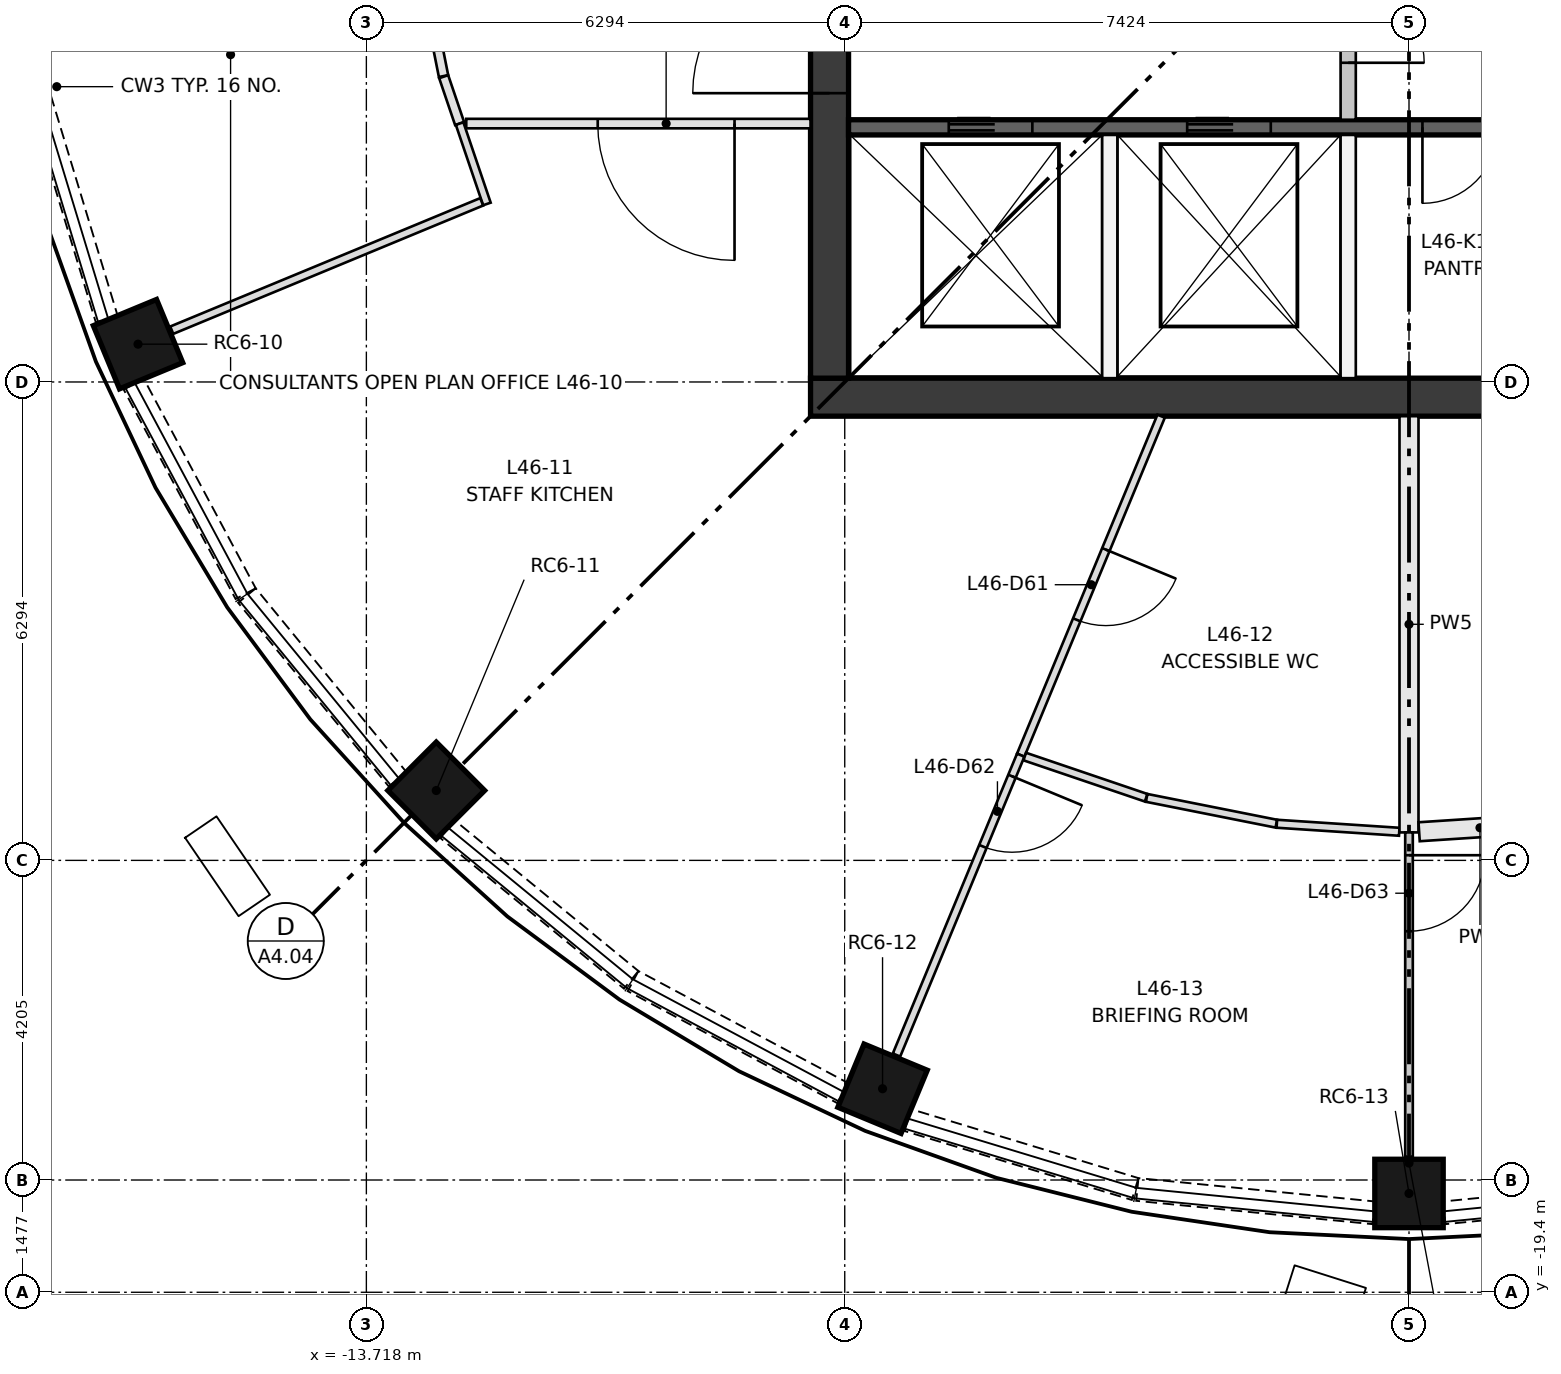
"""IFC4 building model, lengths in metres.
Left out: names, types, materials, properties, quantities, classifications, styles, units other than length and angle.
Written with IfcOpenShell. Run it as: python <this file> out.ifc"""

import sys

from ifc_helpers import new_model, si_unit, direction, frame, frame_2d, origin, origin_2d, place, context, subcontext, project, spatial, rectangle, extrude, element, fill, save


model = new_model("IFC4")
c1 = context("Model", 3, precision=1e-05, world=origin(), true_north=direction((0.0, 1.0)))
c2 = subcontext(c1, "Body", "Model", "MODEL_VIEW")
j1 = project(units=[si_unit("LENGTHUNIT", "METRE"), si_unit("PLANEANGLEUNIT", "RADIAN")], contexts=[c1])
p1 = place(None, origin())
s1 = spatial("IfcSite", under=j1, at=p1, CompositionType="ELEMENT")
p2 = place(p1, origin())
s2 = spatial("IfcBuilding", under=s1, at=p2, CompositionType="ELEMENT")
p3 = place(p2, frame((0.0, 0.0, 174.25)))
s3 = spatial("IfcBuildingStorey", under=s2, at=p3, CompositionType="ELEMENT", Elevation=174.25)
for number, where, z_axis, x_axis in (
    (1, (-16.722, -6.927, 0.0), (0.0, 0.0, 1.0), (-0.924, -0.383, 0.0)),
    (2, (-12.799, -12.799, 0.0), (0.0, 0.0, 1.0), (-0.707, -0.707, 0.0)),
    (3, (-6.927, -16.722, 0.0), (0.0, 0.0, 1.0), (-0.383, -0.924, 0.0)),
    (4, (0.0, -18.1, 0.0), (0.0, 0.0, 1.0), (0.0, -1.0, 0.0)),
):
    element("IfcColumn", number, at=place(p3, frame(where, z_axis=z_axis, x_axis=x_axis)), inside=s3, PredefinedType="COLUMN", context=c2, shape_type="SweptSolid", body=[
        extrude(rectangle(XDim=0.9, YDim=0.9, at=origin_2d()), origin(), (0.0, 0.0, 1.0), 3.35),
    ])
p4 = place(p3, frame((-7.874, -7.624, 0.0), z_axis=(0.0, 0.0, 1.0), x_axis=(1.0, 0.0, 0.0)))
e5 = element("IfcWall", 5, at=p4, inside=s3, PredefinedType="SHEAR", context=c2, shape_type="SweptSolid", body=[
    extrude(rectangle(XDim=15.748, YDim=0.5, at=frame_2d((7.874, 0.0))), origin(), (0.0, 0.0, 1.0), 3.35),
])
p5 = place(p3, frame((-7.624, -7.374, 0.0), z_axis=(0.0, 0.0, 1.0), x_axis=(0.0, 1.0, 0.0)))
e6 = element("IfcWall", 6, at=p5, inside=s3, PredefinedType="SHEAR", context=c2, shape_type="SweptSolid", body=[
    extrude(rectangle(XDim=14.748, YDim=0.5, at=frame_2d((7.374, 0.0))), origin(), (0.0, 0.0, 1.0), 3.35),
])
p6 = place(p5, frame((6.874, 0.0, 0.0)))
e7 = element("IfcOpeningElement", 7, at=p6, cuts=e6, PredefinedType="OPENING", context=c2, shape_type="SweptSolid", body=[
    extrude(rectangle(XDim=1.0, YDim=2.1, at=frame_2d((0.5, 1.05))), frame((0.0, 0.26, 0.0), z_axis=(0.0, -1.0, 0.0), x_axis=(1.0, 0.0, 0.0)), (0.0, 0.0, 1.0), 0.52),
])
p7 = place(p5, frame((3.75, 0.0, 0.0)))
e8 = element("IfcOpeningElement", 8, at=p7, cuts=e6, PredefinedType="OPENING", context=c2, shape_type="SweptSolid", body=[
    extrude(rectangle(XDim=1.8, YDim=2.1, at=frame_2d((0.9, 1.05))), frame((0.0, 0.26, 0.0), z_axis=(0.0, -1.0, 0.0), x_axis=(1.0, 0.0, 0.0)), (0.0, 0.0, 1.0), 0.52),
])
p8 = place(p5, frame((9.198, 0.0, 0.0)))
e9 = element("IfcOpeningElement", 9, at=p8, cuts=e6, PredefinedType="OPENING", context=c2, shape_type="SweptSolid", body=[
    extrude(rectangle(XDim=1.8, YDim=2.1, at=frame_2d((0.9, 1.05))), frame((0.0, 0.26, 0.0), z_axis=(0.0, -1.0, 0.0), x_axis=(1.0, 0.0, 0.0)), (0.0, 0.0, 1.0), 0.52),
])
p9 = place(p3, frame((-7.374, -4.074, 0.0), z_axis=(0.0, 0.0, 1.0), x_axis=(1.0, 0.0, 0.0)))
e10 = element("IfcWall", 10, at=p9, inside=s3, PredefinedType="SHEAR", context=c2, shape_type="SweptSolid", body=[
    extrude(rectangle(XDim=14.748, YDim=0.2, at=frame_2d((7.374, 0.0))), origin(), (0.0, 0.0, 1.0), 3.0),
])
p10 = place(p9, frame((1.319, 0.0, 0.0)))
e11 = element("IfcOpeningElement", 11, at=p10, cuts=e10, PredefinedType="OPENING", context=c2, shape_type="SweptSolid", body=[
    extrude(rectangle(XDim=1.1, YDim=2.1, at=frame_2d((0.55, 1.05))), frame((0.0, 0.11, 0.0), z_axis=(0.0, -1.0, 0.0), x_axis=(1.0, 0.0, 0.0)), (0.0, 0.0, 1.0), 0.22),
])
p11 = place(p9, frame((4.456, 0.0, 0.0)))
e12 = element("IfcOpeningElement", 12, at=p11, cuts=e10, PredefinedType="OPENING", context=c2, shape_type="SweptSolid", body=[
    extrude(rectangle(XDim=1.1, YDim=2.1, at=frame_2d((0.55, 1.05))), frame((0.0, 0.11, 0.0), z_axis=(0.0, -1.0, 0.0), x_axis=(1.0, 0.0, 0.0)), (0.0, 0.0, 1.0), 0.22),
])
p12 = place(p9, frame((7.551, 0.0, 0.0)))
e13 = element("IfcOpeningElement", 13, at=p12, cuts=e10, PredefinedType="OPENING", context=c2, shape_type="SweptSolid", body=[
    extrude(rectangle(XDim=1.0, YDim=2.1, at=frame_2d((0.5, 1.05))), frame((0.0, 0.11, 0.0), z_axis=(0.0, -1.0, 0.0), x_axis=(1.0, 0.0, 0.0)), (0.0, 0.0, 1.0), 0.22),
])
p13 = place(p9, frame((9.914, 0.0, 0.0)))
e14 = element("IfcOpeningElement", 14, at=p13, cuts=e10, PredefinedType="OPENING", context=c2, shape_type="SweptSolid", body=[
    extrude(rectangle(XDim=1.0, YDim=2.1, at=frame_2d((0.5, 1.05))), frame((0.0, 0.11, 0.0), z_axis=(0.0, -1.0, 0.0), x_axis=(1.0, 0.0, 0.0)), (0.0, 0.0, 1.0), 0.22),
])
p14 = place(p9, frame((11.688, 0.0, 0.0)))
e15 = element("IfcOpeningElement", 15, at=p14, cuts=e10, PredefinedType="OPENING", context=c2, shape_type="SweptSolid", body=[
    extrude(rectangle(XDim=1.0, YDim=2.1, at=frame_2d((0.5, 1.05))), frame((0.0, 0.11, 0.0), z_axis=(0.0, -1.0, 0.0), x_axis=(1.0, 0.0, 0.0)), (0.0, 0.0, 1.0), 0.22),
])
p15 = place(p9, frame((13.461, 0.0, 0.0)))
e16 = element("IfcOpeningElement", 16, at=p15, cuts=e10, PredefinedType="OPENING", context=c2, shape_type="SweptSolid", body=[
    extrude(rectangle(XDim=1.0, YDim=2.1, at=frame_2d((0.5, 1.05))), frame((0.0, 0.11, 0.0), z_axis=(0.0, -1.0, 0.0), x_axis=(1.0, 0.0, 0.0)), (0.0, 0.0, 1.0), 0.22),
])
for number, where, z_axis, x_axis in (
    (17, (-3.937, -7.374, 0.0), (0.0, 0.0, 1.0), (0.0, 1.0, 0.0)),
    (18, (-0.8, -7.374, 0.0), (0.0, 0.0, 1.0), (0.0, 1.0, 0.0)),
):
    element("IfcWall", number, at=place(p3, frame(where, z_axis=z_axis, x_axis=x_axis)), inside=s3, PredefinedType="PARTITIONING", context=c2, shape_type="SweptSolid", body=[
        extrude(rectangle(XDim=3.2, YDim=0.2, at=frame_2d((1.6, 0.0))), origin(), (0.0, 0.0, 1.0), 3.0),
    ])
p16 = place(p3, frame((-0.8, -3.974, 0.0), z_axis=(0.0, 0.0, 1.0), x_axis=(0.0, 1.0, 0.0)))
e19 = element("IfcWall", 19, at=p16, inside=s3, PredefinedType="PARTITIONING", context=c2, shape_type="SweptSolid", body=[
    extrude(rectangle(XDim=2.499, YDim=0.2, at=frame_2d((1.25, 0.0))), origin(), (0.0, 0.0, 1.0), 3.0),
])
p17 = place(p16, frame((0.75, 0.0, 0.0)))
e20 = element("IfcOpeningElement", 20, at=p17, cuts=e19, PredefinedType="OPENING", context=c2, shape_type="SweptSolid", body=[
    extrude(rectangle(XDim=1.0, YDim=2.1, at=frame_2d((0.5, 1.05))), frame((0.0, 0.11, 0.0), z_axis=(0.0, -1.0, 0.0), x_axis=(1.0, 0.0, 0.0)), (0.0, 0.0, 1.0), 0.22),
])
p18 = place(p3, frame((-18.042, -3.604, 0.0), z_axis=(0.0, 0.0, 1.0), x_axis=(0.290083245834, -0.957001416136, 0.0)))
e21 = element("IfcWall", 21, at=p18, inside=s3, PredefinedType="SOLIDWALL", context=c2, shape_type="SweptSolid", body=[
    extrude(rectangle(XDim=3.127, YDim=0.3, at=frame_2d((1.563, 0.0))), origin(), (0.0, 0.0, 1.0), 0.9),
])
p19 = place(p3, frame((-16.779, -7.452, 0.0), z_axis=(0.0, 0.0, 1.0), x_axis=(0.47120441036, -0.882024038027, 0.0)))
e22 = element("IfcWall", 22, at=p19, inside=s3, PredefinedType="SOLIDWALL", context=c2, shape_type="SweptSolid", body=[
    extrude(rectangle(XDim=3.125, YDim=0.3, at=frame_2d((1.562, 0.0))), origin(), (0.0, 0.0, 1.0), 0.9),
])
for number, where, z_axis, x_axis in (
    (23, (-15.29, -10.234, 0.0), (0.0, 0.0, 1.0), (0.634, -0.773, 0.0)),
    (24, (-12.651, -13.306, 0.0), (0.0, 0.0, 1.0), (0.773, -0.634, 0.0)),
):
    element("IfcWall", number, at=place(p3, frame(where, z_axis=z_axis, x_axis=x_axis)), inside=s3, PredefinedType="SOLIDWALL", context=c2, shape_type="SweptSolid", body=[
        extrude(rectangle(XDim=3.127, YDim=0.3, at=frame_2d((1.563, 0.0))), origin(), (0.0, 0.0, 1.0), 0.9),
    ])
p20 = place(p3, frame((-10.209, -15.306, 0.0), z_axis=(0.0, 0.0, 1.0), x_axis=(0.882024038027, -0.47120441036, 0.0)))
e25 = element("IfcWall", 25, at=p20, inside=s3, PredefinedType="SOLIDWALL", context=c2, shape_type="SweptSolid", body=[
    extrude(rectangle(XDim=3.125, YDim=0.3, at=frame_2d((1.562, 0.0))), origin(), (0.0, 0.0, 1.0), 0.9),
])
p21 = place(p3, frame((-6.596, -17.135, 0.0), z_axis=(0.0, 0.0, 1.0), x_axis=(0.957001416136, -0.290083245834, 0.0)))
e26 = element("IfcWall", 26, at=p21, inside=s3, PredefinedType="SOLIDWALL", context=c2, shape_type="SweptSolid", body=[
    extrude(rectangle(XDim=3.127, YDim=0.3, at=frame_2d((1.563, 0.0))), origin(), (0.0, 0.0, 1.0), 0.9),
])
for number, where, z_axis, x_axis in (
    (27, (-3.574, -18.048, 0.0), (0.0, 0.0, 1.0), (0.995, -0.098, 0.0)),
    (28, (0.464, -18.354, 0.0), (0.0, 0.0, 1.0), (0.995, 0.098, 0.0)),
):
    element("IfcWall", number, at=place(p3, frame(where, z_axis=z_axis, x_axis=x_axis)), inside=s3, PredefinedType="SOLIDWALL", context=c2, shape_type="SweptSolid", body=[
        extrude(rectangle(XDim=3.125, YDim=0.3, at=frame_2d((1.563, 0.0))), origin(), (0.0, 0.0, 1.0), 0.9),
    ])
p22 = place(p3, frame((-12.703, -3.399, 0.0), z_axis=(0.0, 0.0, 1.0), x_axis=(-0.195101249107, 0.980783106806, 0.0)))
e29 = element("IfcWall", 29, at=p22, inside=s3, PredefinedType="PARTITIONING", context=c2, shape_type="SweptSolid", body=[
    extrude(rectangle(XDim=1.712, YDim=0.125, at=frame_2d((0.856, 0.0))), origin(), (0.0, 0.0, 1.0), 3.0),
])
p23 = place(p22, frame((0.4, 0.0, 0.0)))
e30 = element("IfcOpeningElement", 30, at=p23, cuts=e29, PredefinedType="OPENING", context=c2, shape_type="SweptSolid", body=[
    extrude(rectangle(XDim=1.0, YDim=2.1, at=frame_2d((0.5, 1.05))), frame((0.0, 0.073, 0.0), z_axis=(0.0, -1.0, 0.0), x_axis=(1.0, 0.0, 0.0)), (0.0, 0.0, 1.0), 0.145),
])
p24 = place(p3, frame((-12.491, -4.024, 0.0), z_axis=(0.0, 0.0, 1.0), x_axis=(-0.321506357846, 0.946907419902, 0.0)))
e31 = element("IfcWall", 31, at=p24, inside=s3, PredefinedType="PARTITIONING", context=c2, shape_type="SweptSolid", body=[
    extrude(rectangle(XDim=0.652, YDim=0.125, at=frame_2d((0.326, 0.0))), origin(), (0.0, 0.0, 1.0), 3.0),
])
p25 = place(p3, frame((-7.874, -4.024, 0.0), z_axis=(0.0, 0.0, 1.0), x_axis=(-1.0, 0.0, 0.0)))
e32 = element("IfcWall", 32, at=p25, inside=s3, PredefinedType="PARTITIONING", context=c2, shape_type="SweptSolid", body=[
    extrude(rectangle(XDim=4.53, YDim=0.125, at=frame_2d((2.265, 0.0))), origin(), (0.0, 0.0, 1.0), 3.0),
])
p26 = place(p25, frame((1.0, 0.0, 0.0)))
e33 = element("IfcOpeningElement", 33, at=p26, cuts=e32, PredefinedType="OPENING", context=c2, shape_type="SweptSolid", body=[
    extrude(rectangle(XDim=1.8, YDim=2.1, at=frame_2d((0.9, 1.05))), frame((0.0, 0.073, 0.0), z_axis=(0.0, -1.0, 0.0), x_axis=(1.0, 0.0, 0.0)), (0.0, 0.0, 1.0), 0.145),
])
p27 = place(p3, frame((-12.491, -4.024, 0.0), z_axis=(0.0, 0.0, 1.0), x_axis=(0.321534356008, -0.946897913139, 0.0)))
e34 = element("IfcWall", 34, at=p27, inside=s3, PredefinedType="PARTITIONING", context=c2, shape_type="SweptSolid", body=[
    extrude(rectangle(XDim=1.117, YDim=0.105, at=frame_2d((0.559, 0.0))), origin(), (0.0, 0.0, 1.0), 3.0),
])
p28 = place(p3, frame((-12.201, -5.054, 0.0), z_axis=(0.0, 0.0, 1.0), x_axis=(-0.923879989031, -0.382682330227, 0.0)))
e35 = element("IfcWall", 35, at=p28, inside=s3, PredefinedType="PARTITIONING", context=c2, shape_type="SweptSolid", body=[
    extrude(rectangle(XDim=4.414, YDim=0.105, at=frame_2d((2.207, 0.0))), origin(), (0.0, 0.0, 1.0), 3.0),
])
p29 = place(p3, frame((-3.261, -7.874, 0.0), z_axis=(0.0, 0.0, 1.0), x_axis=(-0.382707643949, -0.923869503373, 0.0)))
e36 = element("IfcWall", 36, at=p29, inside=s3, PredefinedType="PARTITIONING", context=c2, shape_type="SweptSolid", body=[
    extrude(rectangle(XDim=4.827, YDim=0.105, at=frame_2d((2.414, 0.0))), origin(), (0.0, 0.0, 1.0), 3.0),
])
p30 = place(p29, frame((1.9, 0.0, 0.0)))
e37 = element("IfcOpeningElement", 37, at=p30, cuts=e36, PredefinedType="OPENING", context=c2, shape_type="SweptSolid", body=[
    extrude(rectangle(XDim=1.0, YDim=2.1, at=frame_2d((0.5, 1.05))), frame((0.0, 0.062, 0.0), z_axis=(0.0, -1.0, 0.0), x_axis=(1.0, 0.0, 0.0)), (0.0, 0.0, 1.0), 0.125),
])
p31 = place(p3, frame((-5.109, -12.334, 0.0), z_axis=(0.0, 0.0, 1.0), x_axis=(-0.382669916503, -0.923885130849, 0.0)))
e38 = element("IfcWall", 38, at=p31, inside=s3, PredefinedType="PARTITIONING", context=c2, shape_type="SweptSolid", body=[
    extrude(rectangle(XDim=4.27, YDim=0.105, at=frame_2d((2.135, 0.0))), origin(), (0.0, 0.0, 1.0), 3.0),
])
p32 = place(p31, frame((0.3, 0.0, 0.0)))
e39 = element("IfcOpeningElement", 39, at=p32, cuts=e38, PredefinedType="OPENING", context=c2, shape_type="SweptSolid", body=[
    extrude(rectangle(XDim=1.0, YDim=2.1, at=frame_2d((0.5, 1.05))), frame((0.0, 0.062, 0.0), z_axis=(0.0, -1.0, 0.0), x_axis=(1.0, 0.0, 0.0)), (0.0, 0.0, 1.0), 0.125),
])
p33 = place(p3, frame((-3.458, -12.894, 0.0), z_axis=(0.0, 0.0, 1.0), x_axis=(-0.946917341597, 0.321477134773, 0.0)))
e40 = element("IfcWall", 40, at=p33, inside=s3, PredefinedType="PARTITIONING", context=c2, shape_type="SweptSolid", body=[
    extrude(rectangle(XDim=1.687, YDim=0.105, at=frame_2d((0.843, 0.0))), origin(), (0.0, 0.0, 1.0), 3.0),
])
p34 = place(p3, frame((-1.746, -13.235, 0.0), z_axis=(0.0, 0.0, 1.0), x_axis=(-0.980785270285, 0.195090372882, 0.0)))
e41 = element("IfcWall", 41, at=p34, inside=s3, PredefinedType="PARTITIONING", context=c2, shape_type="SweptSolid", body=[
    extrude(rectangle(XDim=1.74, YDim=0.105, at=frame_2d((0.87, 0.0))), origin(), (0.0, 0.0, 1.0), 3.0),
])
p35 = place(p3, frame((-0.128, -13.342, 0.0), z_axis=(0.0, 0.0, 1.0), x_axis=(-0.997862773684, 0.065344356258, 0.0)))
e42 = element("IfcWall", 42, at=p35, inside=s3, PredefinedType="PARTITIONING", context=c2, shape_type="SweptSolid", body=[
    extrude(rectangle(XDim=1.614, YDim=0.105, at=frame_2d((0.807, 0.0))), origin(), (0.0, 0.0, 1.0), 3.0),
])
p36 = place(p3, frame((0.0, -7.874, 0.0), z_axis=(0.0, 0.0, 1.0), x_axis=(0.0, -1.0, 0.0)))
e43 = element("IfcWall", 43, at=p36, inside=s3, PredefinedType="PARTITIONING", context=c2, shape_type="SweptSolid", body=[
    extrude(rectangle(XDim=5.476, YDim=0.25, at=frame_2d((2.738, 0.0))), origin(), (0.0, 0.0, 1.0), 3.0),
])
p37 = place(p3, frame((0.0, -13.35, 0.0), z_axis=(0.0, 0.0, 1.0), x_axis=(0.0, -1.0, 0.0)))
e44 = element("IfcWall", 44, at=p37, inside=s3, PredefinedType="PARTITIONING", context=c2, shape_type="SweptSolid", body=[
    extrude(rectangle(XDim=4.27, YDim=0.1, at=frame_2d((2.135, 0.0))), origin(), (0.0, 0.0, 1.0), 3.0),
])
p38 = place(p37, frame((0.3, 0.0, 0.0)))
e45 = element("IfcOpeningElement", 45, at=p38, cuts=e44, PredefinedType="OPENING", context=c2, shape_type="SweptSolid", body=[
    extrude(rectangle(XDim=1.0, YDim=2.1, at=frame_2d((0.5, 1.05))), frame((0.0, 0.06, 0.0), z_axis=(0.0, -1.0, 0.0), x_axis=(1.0, 0.0, 0.0)), (0.0, 0.0, 1.0), 0.12),
])
p39 = place(p3, frame((1.734, -13.236, 0.0), z_axis=(0.0, 0.0, 1.0), x_axis=(-0.997857274773, -0.065428275107, 0.0)))
e46 = element("IfcWall", 46, at=p39, inside=s3, PredefinedType="PARTITIONING", context=c2, shape_type="SweptSolid", body=[
    extrude(rectangle(XDim=1.604, YDim=0.25, at=frame_2d((0.802, 0.0))), origin(), (0.0, 0.0, 1.0), 3.0),
])
p40 = place(p10, origin())
e47 = element("IfcDoor", 47, at=p40, inside=s3, OperationType="DOUBLE_DOOR_SLIDING", PredefinedType="DOOR", context=c2, shape_type="SweptSolid", body=[
    extrude(rectangle(XDim=1.1, YDim=2.1, at=frame_2d((0.55, 1.05))), frame((0.0, 0.025, 0.0), z_axis=(0.0, -1.0, 0.0), x_axis=(1.0, 0.0, 0.0)), (0.0, 0.0, 1.0), 0.05),
])
fill(e11, e47)
p41 = place(p11, origin())
e48 = element("IfcDoor", 48, at=p41, inside=s3, OperationType="DOUBLE_DOOR_SLIDING", PredefinedType="DOOR", context=c2, shape_type="SweptSolid", body=[
    extrude(rectangle(XDim=1.1, YDim=2.1, at=frame_2d((0.55, 1.05))), frame((0.0, 0.025, 0.0), z_axis=(0.0, -1.0, 0.0), x_axis=(1.0, 0.0, 0.0)), (0.0, 0.0, 1.0), 0.05),
])
fill(e12, e48)
p42 = place(p17, frame((1.0, 0.0, 0.0), z_axis=(0.0, 0.0, 1.0), x_axis=(-1.0, 0.0, 0.0)))
e49 = element("IfcDoor", 49, at=p42, inside=s3, OperationType="SINGLE_SWING_LEFT", PredefinedType="DOOR", context=c2, shape_type="SweptSolid", body=[
    extrude(rectangle(XDim=1.0, YDim=2.1, at=frame_2d((0.5, 1.05))), frame((0.0, 0.025, 0.0), z_axis=(0.0, -1.0, 0.0), x_axis=(1.0, 0.0, 0.0)), (0.0, 0.0, 1.0), 0.05),
])
fill(e20, e49)
p43 = place(p12, frame((1.0, 0.0, 0.0), z_axis=(0.0, 0.0, 1.0), x_axis=(-1.0, 0.0, 0.0)))
e50 = element("IfcDoor", 50, at=p43, inside=s3, OperationType="SINGLE_SWING_LEFT", PredefinedType="DOOR", context=c2, shape_type="SweptSolid", body=[
    extrude(rectangle(XDim=1.0, YDim=2.1, at=frame_2d((0.5, 1.05))), frame((0.0, 0.025, 0.0), z_axis=(0.0, -1.0, 0.0), x_axis=(1.0, 0.0, 0.0)), (0.0, 0.0, 1.0), 0.05),
])
fill(e13, e50)
p44 = place(p7, origin())
e51 = element("IfcDoor", 51, at=p44, inside=s3, OperationType="DOUBLE_DOOR_SINGLE_SWING", PredefinedType="DOOR", context=c2, shape_type="SweptSolid", body=[
    extrude(rectangle(XDim=1.8, YDim=2.1, at=frame_2d((0.9, 1.05))), frame((0.0, 0.025, 0.0), z_axis=(0.0, -1.0, 0.0), x_axis=(1.0, 0.0, 0.0)), (0.0, 0.0, 1.0), 0.05),
])
fill(e8, e51)
p45 = place(p26, origin())
e52 = element("IfcDoor", 52, at=p45, inside=s3, OperationType="DOUBLE_DOOR_SINGLE_SWING", PredefinedType="DOOR", context=c2, shape_type="SweptSolid", body=[
    extrude(rectangle(XDim=1.8, YDim=2.1, at=frame_2d((0.9, 1.05))), frame((0.0, 0.025, 0.0), z_axis=(0.0, -1.0, 0.0), x_axis=(1.0, 0.0, 0.0)), (0.0, 0.0, 1.0), 0.05),
])
fill(e33, e52)
p46 = place(p30, origin())
e53 = element("IfcDoor", 53, at=p46, inside=s3, OperationType="SINGLE_SWING_LEFT", PredefinedType="DOOR", context=c2, shape_type="SweptSolid", body=[
    extrude(rectangle(XDim=1.0, YDim=2.1, at=frame_2d((0.5, 1.05))), frame((0.0, 0.025, 0.0), z_axis=(0.0, -1.0, 0.0), x_axis=(1.0, 0.0, 0.0)), (0.0, 0.0, 1.0), 0.05),
])
fill(e37, e53)
p47 = place(p32, origin())
e54 = element("IfcDoor", 54, at=p47, inside=s3, OperationType="SINGLE_SWING_LEFT", PredefinedType="DOOR", context=c2, shape_type="SweptSolid", body=[
    extrude(rectangle(XDim=1.0, YDim=2.1, at=frame_2d((0.5, 1.05))), frame((0.0, 0.025, 0.0), z_axis=(0.0, -1.0, 0.0), x_axis=(1.0, 0.0, 0.0)), (0.0, 0.0, 1.0), 0.05),
])
fill(e39, e54)
p48 = place(p38, origin())
e55 = element("IfcDoor", 55, at=p48, inside=s3, OperationType="SINGLE_SWING_LEFT", PredefinedType="DOOR", context=c2, shape_type="SweptSolid", body=[
    extrude(rectangle(XDim=1.0, YDim=2.1, at=frame_2d((0.5, 1.05))), frame((0.0, 0.025, 0.0), z_axis=(0.0, -1.0, 0.0), x_axis=(1.0, 0.0, 0.0)), (0.0, 0.0, 1.0), 0.05),
])
fill(e45, e55)
save(model, sys.argv[1])
